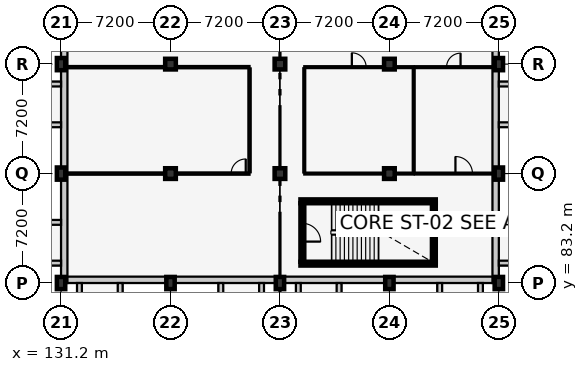
"""IFC4 building model, lengths in metres.
Left out: names, types, materials, properties, quantities, classifications, styles, units other than length and angle.
Written with IfcOpenShell. Run it as: python <this file> out.ifc"""

import sys

from ifc_helpers import new_model, si_unit, direction, frame, frame_2d, origin, origin_2d, place, context, subcontext, project, spatial, rectangle, extrude, element, fill, save


model = new_model("IFC4")
c1 = context("Model", 3, precision=1e-05, world=origin(), true_north=direction((0.0, 1.0)))
c2 = subcontext(c1, "Body", "Model", "MODEL_VIEW")
j1 = project(units=[si_unit("LENGTHUNIT", "METRE"), si_unit("PLANEANGLEUNIT", "RADIAN")], contexts=[c1])
p1 = place(None, origin())
s1 = spatial("IfcSite", under=j1, at=p1, CompositionType="ELEMENT")
p2 = place(p1, origin())
s2 = spatial("IfcBuilding", under=s1, at=p2, CompositionType="ELEMENT")
p3 = place(p2, frame((0.0, 0.0, 13.8)))
s3 = spatial("IfcBuildingStorey", under=s2, at=p3, CompositionType="ELEMENT", Elevation=13.8)
for number, where, z_axis, x_axis in (
    (1, (131.2, 83.2, 0.0), (0.0, 0.0, 1.0), (1.0, 0.0, 0.0)),
    (2, (131.2, 90.4, 0.0), (0.0, 0.0, 1.0), (1.0, 0.0, 0.0)),
    (3, (131.2, 97.6, 0.0), (0.0, 0.0, 1.0), (1.0, 0.0, 0.0)),
    (4, (138.4, 83.2, 0.0), (0.0, 0.0, 1.0), (1.0, 0.0, 0.0)),
):
    element("IfcColumn", number, at=place(p3, frame(where, z_axis=z_axis, x_axis=x_axis)), inside=s3, PredefinedType="COLUMN", context=c2, shape_type="SweptSolid", body=[
        extrude(rectangle(XDim=0.55, YDim=0.8, at=origin_2d()), origin(), (0.0, 0.0, 1.0), 4.2),
    ])
for number, where, z_axis, x_axis in (
    (5, (138.4, 90.4, 0.0), (0.0, 0.0, 1.0), (1.0, 0.0, 0.0)),
    (6, (138.4, 97.6, 0.0), (0.0, 0.0, 1.0), (1.0, 0.0, 0.0)),
):
    element("IfcColumn", number, at=place(p3, frame(where, z_axis=z_axis, x_axis=x_axis)), inside=s3, PredefinedType="COLUMN", context=c2, shape_type="SweptSolid", body=[
        extrude(rectangle(XDim=0.7, YDim=0.7, at=origin_2d()), origin(), (0.0, 0.0, 1.0), 4.2),
    ])
p4 = place(p3, frame((145.6, 83.2, 0.0), z_axis=(0.0, 0.0, 1.0), x_axis=(1.0, 0.0, 0.0)))
e7 = element("IfcColumn", 7, at=p4, inside=s3, PredefinedType="COLUMN", context=c2, shape_type="SweptSolid", body=[
    extrude(rectangle(XDim=0.55, YDim=0.8, at=origin_2d()), origin(), (0.0, 0.0, 1.0), 4.2),
])
for number, where, z_axis, x_axis in (
    (8, (145.6, 90.4, 0.0), (0.0, 0.0, 1.0), (1.0, 0.0, 0.0)),
    (9, (145.6, 97.6, 0.0), (0.0, 0.0, 1.0), (1.0, 0.0, 0.0)),
):
    element("IfcColumn", number, at=place(p3, frame(where, z_axis=z_axis, x_axis=x_axis)), inside=s3, PredefinedType="COLUMN", context=c2, shape_type="SweptSolid", body=[
        extrude(rectangle(XDim=0.7, YDim=0.7, at=origin_2d()), origin(), (0.0, 0.0, 1.0), 4.2),
    ])
p5 = place(p3, frame((152.8, 83.2, 0.0), z_axis=(0.0, 0.0, 1.0), x_axis=(1.0, 0.0, 0.0)))
e10 = element("IfcColumn", 10, at=p5, inside=s3, PredefinedType="COLUMN", context=c2, shape_type="SweptSolid", body=[
    extrude(rectangle(XDim=0.55, YDim=0.8, at=origin_2d()), origin(), (0.0, 0.0, 1.0), 4.2),
])
for number, where, z_axis, x_axis in (
    (11, (152.8, 90.4, 0.0), (0.0, 0.0, 1.0), (1.0, 0.0, 0.0)),
    (12, (152.8, 97.6, 0.0), (0.0, 0.0, 1.0), (1.0, 0.0, 0.0)),
):
    element("IfcColumn", number, at=place(p3, frame(where, z_axis=z_axis, x_axis=x_axis)), inside=s3, PredefinedType="COLUMN", context=c2, shape_type="SweptSolid", body=[
        extrude(rectangle(XDim=0.7, YDim=0.7, at=origin_2d()), origin(), (0.0, 0.0, 1.0), 4.2),
    ])
for number, where, z_axis, x_axis in (
    (13, (160.0, 83.2, 0.0), (0.0, 0.0, 1.0), (1.0, 0.0, 0.0)),
    (14, (160.0, 90.4, 0.0), (0.0, 0.0, 1.0), (1.0, 0.0, 0.0)),
    (15, (160.0, 97.6, 0.0), (0.0, 0.0, 1.0), (1.0, 0.0, 0.0)),
):
    element("IfcColumn", number, at=place(p3, frame(where, z_axis=z_axis, x_axis=x_axis)), inside=s3, PredefinedType="COLUMN", context=c2, shape_type="SweptSolid", body=[
        extrude(rectangle(XDim=0.55, YDim=0.8, at=origin_2d()), origin(), (0.0, 0.0, 1.0), 4.2),
    ])
p6 = place(p3, frame((160.0, 83.41, 0.0), z_axis=(0.0, 0.0, 1.0), x_axis=(-1.0, 0.0, 0.0)))
e16 = element("IfcWall", 16, at=p6, inside=s3, PredefinedType="SOLIDWALL", context=c2, shape_type="SweptSolid", body=[
    extrude(rectangle(XDim=28.8, YDim=0.42, at=frame_2d((14.4, 0.0))), origin(), (0.0, 0.0, 1.0), 3.245),
])
p7 = place(p3, frame((132.41, 83.2, 0.0), z_axis=(0.0, 0.0, 1.0), x_axis=(0.0, -1.0, 0.0)))
e17 = element("IfcWall", 17, at=p7, inside=s3, PredefinedType="SOLIDWALL", context=c2, shape_type="SweptSolid", body=[
    extrude(rectangle(XDim=1.793, YDim=0.32, at=frame_2d((0.896, 0.0))), origin(), (0.0, 0.0, 1.0), 3.93),
])
for number, where, z_axis, x_axis in (
    (18, (135.09, 83.2, 0.0), (0.0, 0.0, 1.0), (0.0, -1.0, 0.0)),
    (19, (141.71, 83.2, 0.0), (0.0, 0.0, 1.0), (0.0, -1.0, 0.0)),
):
    element("IfcWall", number, at=place(p3, frame(where, z_axis=z_axis, x_axis=x_axis)), inside=s3, PredefinedType="SOLIDWALL", context=c2, shape_type="SweptSolid", body=[
        extrude(rectangle(XDim=1.35, YDim=0.32, at=frame_2d((0.675, 0.0))), origin(), (0.0, 0.0, 1.0), 3.93),
    ])
for number, where, z_axis, x_axis in (
    (20, (144.39, 83.2, 0.0), (0.0, 0.0, 1.0), (0.0, -1.0, 0.0)),
    (21, (146.81, 83.2, 0.0), (0.0, 0.0, 1.0), (0.0, -1.0, 0.0)),
):
    element("IfcWall", number, at=place(p3, frame(where, z_axis=z_axis, x_axis=x_axis)), inside=s3, PredefinedType="SOLIDWALL", context=c2, shape_type="SweptSolid", body=[
        extrude(rectangle(XDim=1.793, YDim=0.32, at=frame_2d((0.896, 0.0))), origin(), (0.0, 0.0, 1.0), 3.93),
    ])
for number, where, z_axis, x_axis in (
    (22, (149.49, 83.2, 0.0), (0.0, 0.0, 1.0), (0.0, -1.0, 0.0)),
    (23, (156.11, 83.2, 0.0), (0.0, 0.0, 1.0), (0.0, -1.0, 0.0)),
):
    element("IfcWall", number, at=place(p3, frame(where, z_axis=z_axis, x_axis=x_axis)), inside=s3, PredefinedType="SOLIDWALL", context=c2, shape_type="SweptSolid", body=[
        extrude(rectangle(XDim=1.35, YDim=0.32, at=frame_2d((0.675, 0.0))), origin(), (0.0, 0.0, 1.0), 3.93),
    ])
p8 = place(p3, frame((158.79, 83.2, 0.0), z_axis=(0.0, 0.0, 1.0), x_axis=(0.0, -1.0, 0.0)))
e24 = element("IfcWall", 24, at=p8, inside=s3, PredefinedType="SOLIDWALL", context=c2, shape_type="SweptSolid", body=[
    extrude(rectangle(XDim=1.793, YDim=0.32, at=frame_2d((0.896, 0.0))), origin(), (0.0, 0.0, 1.0), 3.93),
])
p9 = place(p3, frame((159.79, 112.0, 0.0), z_axis=(0.0, 0.0, 1.0), x_axis=(0.0, -1.0, 0.0)))
e25 = element("IfcWall", 25, at=p9, inside=s3, PredefinedType="SOLIDWALL", context=c2, shape_type="SweptSolid", body=[
    extrude(rectangle(XDim=28.8, YDim=0.42, at=frame_2d((14.4, 0.0))), origin(), (0.0, 0.0, 1.0), 3.205),
])
p10 = place(p3, frame((160.0, 84.51, 0.0), z_axis=(0.0, 0.0, 1.0), x_axis=(1.0, 0.0, 0.0)))
e26 = element("IfcWall", 26, at=p10, inside=s3, PredefinedType="SOLIDWALL", context=c2, shape_type="SweptSolid", body=[
    extrude(rectangle(XDim=1.35, YDim=0.32, at=frame_2d((0.675, 0.0))), origin(), (0.0, 0.0, 1.0), 3.93),
])
for number, where, z_axis, x_axis in (
    (27, (160.0, 87.19, 0.0), (0.0, 0.0, 1.0), (1.0, 0.0, 0.0)),
    (28, (160.0, 93.61, 0.0), (0.0, 0.0, 1.0), (1.0, 0.0, 0.0)),
):
    element("IfcWall", number, at=place(p3, frame(where, z_axis=z_axis, x_axis=x_axis)), inside=s3, PredefinedType="SOLIDWALL", context=c2, shape_type="SweptSolid", body=[
        extrude(rectangle(XDim=1.793, YDim=0.32, at=frame_2d((0.896, 0.0))), origin(), (0.0, 0.0, 1.0), 3.93),
    ])
p11 = place(p3, frame((160.0, 96.29, 0.0), z_axis=(0.0, 0.0, 1.0), x_axis=(1.0, 0.0, 0.0)))
e29 = element("IfcWall", 29, at=p11, inside=s3, PredefinedType="SOLIDWALL", context=c2, shape_type="SweptSolid", body=[
    extrude(rectangle(XDim=1.35, YDim=0.32, at=frame_2d((0.675, 0.0))), origin(), (0.0, 0.0, 1.0), 3.93),
])
p12 = place(p3, frame((131.41, 83.2, 0.0), z_axis=(0.0, 0.0, 1.0), x_axis=(0.0, 1.0, 0.0)))
e30 = element("IfcWall", 30, at=p12, inside=s3, PredefinedType="SOLIDWALL", context=c2, shape_type="SweptSolid", body=[
    extrude(rectangle(XDim=28.8, YDim=0.42, at=frame_2d((14.4, 0.0))), origin(), (0.0, 0.0, 1.0), 3.205),
])
p13 = place(p3, frame((131.2, 84.51, 0.0), z_axis=(0.0, 0.0, 1.0), x_axis=(-1.0, 0.0, 0.0)))
e31 = element("IfcWall", 31, at=p13, inside=s3, PredefinedType="SOLIDWALL", context=c2, shape_type="SweptSolid", body=[
    extrude(rectangle(XDim=1.793, YDim=0.32, at=frame_2d((0.896, 0.0))), origin(), (0.0, 0.0, 1.0), 3.93),
])
for number, where, z_axis, x_axis in (
    (32, (131.2, 87.19, 0.0), (0.0, 0.0, 1.0), (-1.0, 0.0, 0.0)),
    (33, (131.2, 93.61, 0.0), (0.0, 0.0, 1.0), (-1.0, 0.0, 0.0)),
):
    element("IfcWall", number, at=place(p3, frame(where, z_axis=z_axis, x_axis=x_axis)), inside=s3, PredefinedType="SOLIDWALL", context=c2, shape_type="SweptSolid", body=[
        extrude(rectangle(XDim=1.35, YDim=0.32, at=frame_2d((0.675, 0.0))), origin(), (0.0, 0.0, 1.0), 3.93),
    ])
p14 = place(p3, frame((131.2, 96.29, 0.0), z_axis=(0.0, 0.0, 1.0), x_axis=(-1.0, 0.0, 0.0)))
e34 = element("IfcWall", 34, at=p14, inside=s3, PredefinedType="SOLIDWALL", context=c2, shape_type="SweptSolid", body=[
    extrude(rectangle(XDim=1.793, YDim=0.32, at=frame_2d((0.896, 0.0))), origin(), (0.0, 0.0, 1.0), 3.93),
])
for number, where, z_axis, x_axis in (
    (35, (146.95, 84.475, 0.0), (0.0, 0.0, 1.0), (1.0, 0.0, 0.0)),
    (36, (155.85, 88.575, 0.0), (0.0, 0.0, 1.0), (-1.0, 0.0, 0.0)),
):
    element("IfcWall", number, at=place(p3, frame(where, z_axis=z_axis, x_axis=x_axis)), inside=s3, PredefinedType="SHEAR", context=c2, shape_type="SweptSolid", body=[
        extrude(rectangle(XDim=8.9, YDim=0.25, at=frame_2d((4.45, 0.0))), origin(), (0.0, 0.0, 1.0), 3.95),
    ])
p15 = place(p3, frame((147.075, 88.45, 0.0), z_axis=(0.0, 0.0, 1.0), x_axis=(0.0, -1.0, 0.0)))
e37 = element("IfcWall", 37, at=p15, inside=s3, PredefinedType="SHEAR", context=c2, shape_type="SweptSolid", body=[
    extrude(rectangle(XDim=3.85, YDim=0.25, at=frame_2d((1.925, 0.0))), origin(), (0.0, 0.0, 1.0), 3.95),
])
p16 = place(p15, frame((1.325, 0.0, 0.0)))
e38 = element("IfcOpeningElement", 38, at=p16, cuts=e37, PredefinedType="OPENING", context=c2, shape_type="SweptSolid", body=[
    extrude(rectangle(XDim=1.2, YDim=2.15, at=frame_2d((0.6, 1.075))), frame((0.0, 0.137, 0.0), z_axis=(0.0, -1.0, 0.0), x_axis=(1.0, 0.0, 0.0)), (0.0, 0.0, 1.0), 0.274),
])
p17 = place(p3, frame((155.725, 84.6, 0.0), z_axis=(0.0, 0.0, 1.0), x_axis=(0.0, 1.0, 0.0)))
e39 = element("IfcWall", 39, at=p17, inside=s3, PredefinedType="SHEAR", context=c2, shape_type="SweptSolid", body=[
    extrude(rectangle(XDim=3.85, YDim=0.25, at=frame_2d((1.925, 0.0))), origin(), (0.0, 0.0, 1.0), 3.95),
])
p18 = place(p3, frame((131.63, 90.4, 0.0), z_axis=(0.0, 0.0, 1.0), x_axis=(1.0, 0.0, 0.0)))
e40 = element("IfcWall", 40, at=p18, inside=s3, PredefinedType="PARTITIONING", context=c2, shape_type="SweptSolid", body=[
    extrude(rectangle(XDim=11.97, YDim=0.15, at=frame_2d((5.985, 0.0))), origin(), (0.0, 0.0, 1.0), 3.175),
])
p19 = place(p18, frame((10.76, 0.0, 0.0)))
e41 = element("IfcOpeningElement", 41, at=p19, cuts=e40, PredefinedType="OPENING", context=c2, shape_type="SweptSolid", body=[
    extrude(rectangle(XDim=0.96, YDim=2.1, at=frame_2d((0.48, 1.05))), frame((0.0, 0.087, 0.0), z_axis=(0.0, -1.0, 0.0), x_axis=(1.0, 0.0, 0.0)), (0.0, 0.0, 1.0), 0.174),
])
p20 = place(p3, frame((131.63, 97.4, 0.0), z_axis=(0.0, 0.0, 1.0), x_axis=(1.0, 0.0, 0.0)))
e42 = element("IfcWall", 42, at=p20, inside=s3, PredefinedType="PARTITIONING", context=c2, shape_type="SweptSolid", body=[
    extrude(rectangle(XDim=11.97, YDim=0.15, at=frame_2d((5.985, 0.0))), origin(), (0.0, 0.0, 1.0), 3.175),
])
p21 = place(p3, frame((143.6, 90.485, 0.0), z_axis=(0.0, 0.0, 1.0), x_axis=(0.0, 1.0, 0.0)))
e43 = element("IfcWall", 43, at=p21, inside=s3, PredefinedType="PARTITIONING", context=c2, shape_type="SweptSolid", body=[
    extrude(rectangle(XDim=6.83, YDim=0.15, at=frame_2d((3.415, 0.0))), origin(), (0.0, 0.0, 1.0), 3.95),
])
p22 = place(p3, frame((147.2, 90.4, 0.0), z_axis=(0.0, 0.0, 1.0), x_axis=(1.0, 0.0, 0.0)))
e44 = element("IfcWall", 44, at=p22, inside=s3, PredefinedType="PARTITIONING", context=c2, shape_type="SweptSolid", body=[
    extrude(rectangle(XDim=7.2, YDim=0.125, at=frame_2d((3.6, 0.0))), origin(), (0.0, 0.0, 1.0), 3.075),
])
p23 = place(p3, frame((147.2, 97.4, 0.0), z_axis=(0.0, 0.0, 1.0), x_axis=(1.0, 0.0, 0.0)))
e45 = element("IfcWall", 45, at=p23, inside=s3, PredefinedType="PARTITIONING", context=c2, shape_type="SweptSolid", body=[
    extrude(rectangle(XDim=7.2, YDim=0.125, at=frame_2d((3.6, 0.0))), origin(), (0.0, 0.0, 1.0), 3.075),
])
p24 = place(p23, frame((3.13, 0.0, 0.0)))
e46 = element("IfcOpeningElement", 46, at=p24, cuts=e45, PredefinedType="OPENING", context=c2, shape_type="SweptSolid", body=[
    extrude(rectangle(XDim=0.94, YDim=2.1, at=frame_2d((0.47, 1.05))), frame((0.0, 0.074, 0.0), z_axis=(0.0, -1.0, 0.0), x_axis=(1.0, 0.0, 0.0)), (0.0, 0.0, 1.0), 0.149),
])
for number, where, z_axis, x_axis in (
    (47, (147.2, 90.472, 0.0), (0.0, 0.0, 1.0), (0.0, 1.0, 0.0)),
    (48, (154.4, 90.472, 0.0), (0.0, 0.0, 1.0), (0.0, 1.0, 0.0)),
):
    element("IfcWall", number, at=place(p3, frame(where, z_axis=z_axis, x_axis=x_axis)), inside=s3, PredefinedType="PARTITIONING", context=c2, shape_type="SweptSolid", body=[
        extrude(rectangle(XDim=6.855, YDim=0.125, at=frame_2d((3.427, 0.0))), origin(), (0.0, 0.0, 1.0), 3.95),
    ])
p25 = place(p3, frame((154.472, 90.4, 0.0), z_axis=(0.0, 0.0, 1.0), x_axis=(1.0, 0.0, 0.0)))
e49 = element("IfcWall", 49, at=p25, inside=s3, PredefinedType="PARTITIONING", context=c2, shape_type="SweptSolid", body=[
    extrude(rectangle(XDim=5.098, YDim=0.125, at=frame_2d((2.549, 0.0))), origin(), (0.0, 0.0, 1.0), 3.275),
])
p26 = place(p25, frame((2.673, 0.0, 0.0)))
e50 = element("IfcOpeningElement", 50, at=p26, cuts=e49, PredefinedType="OPENING", context=c2, shape_type="SweptSolid", body=[
    extrude(rectangle(XDim=1.12, YDim=2.15, at=frame_2d((0.56, 1.075))), frame((0.0, 0.074, 0.0), z_axis=(0.0, -1.0, 0.0), x_axis=(1.0, 0.0, 0.0)), (0.0, 0.0, 1.0), 0.149),
])
p27 = place(p3, frame((154.472, 97.4, 0.0), z_axis=(0.0, 0.0, 1.0), x_axis=(1.0, 0.0, 0.0)))
e51 = element("IfcWall", 51, at=p27, inside=s3, PredefinedType="PARTITIONING", context=c2, shape_type="SweptSolid", body=[
    extrude(rectangle(XDim=5.098, YDim=0.125, at=frame_2d((2.549, 0.0))), origin(), (0.0, 0.0, 1.0), 3.275),
])
p28 = place(p27, frame((2.089, 0.0, 0.0)))
e52 = element("IfcOpeningElement", 52, at=p28, cuts=e51, PredefinedType="OPENING", context=c2, shape_type="SweptSolid", body=[
    extrude(rectangle(XDim=0.92, YDim=2.08, at=frame_2d((0.46, 1.04))), frame((0.0, 0.074, 0.0), z_axis=(0.0, -1.0, 0.0), x_axis=(1.0, 0.0, 0.0)), (0.0, 0.0, 1.0), 0.149),
])
p29 = place(p16, origin())
e53 = element("IfcDoor", 53, at=p29, inside=s3, OperationType="SINGLE_SWING_RIGHT", PredefinedType="DOOR", context=c2, shape_type="SweptSolid", body=[
    extrude(rectangle(XDim=1.2, YDim=2.15, at=frame_2d((0.6, 1.075))), frame((0.0, 0.025, 0.0), z_axis=(0.0, -1.0, 0.0), x_axis=(1.0, 0.0, 0.0)), (0.0, 0.0, 1.0), 0.05),
])
fill(e38, e53)
p30 = place(p19, origin())
e54 = element("IfcDoor", 54, at=p30, inside=s3, OperationType="SINGLE_SWING_RIGHT", PredefinedType="DOOR", context=c2, shape_type="SweptSolid", body=[
    extrude(rectangle(XDim=0.96, YDim=2.1, at=frame_2d((0.48, 1.05))), frame((0.0, 0.025, 0.0), z_axis=(0.0, -1.0, 0.0), x_axis=(1.0, 0.0, 0.0)), (0.0, 0.0, 1.0), 0.05),
])
fill(e41, e54)
p31 = place(p24, origin())
e55 = element("IfcDoor", 55, at=p31, inside=s3, OperationType="SINGLE_SWING_LEFT", PredefinedType="DOOR", context=c2, shape_type="SweptSolid", body=[
    extrude(rectangle(XDim=0.94, YDim=2.1, at=frame_2d((0.47, 1.05))), frame((0.0, 0.025, 0.0), z_axis=(0.0, -1.0, 0.0), x_axis=(1.0, 0.0, 0.0)), (0.0, 0.0, 1.0), 0.05),
])
fill(e46, e55)
p32 = place(p28, origin())
e56 = element("IfcDoor", 56, at=p32, inside=s3, OperationType="SINGLE_SWING_RIGHT", PredefinedType="DOOR", context=c2, shape_type="SweptSolid", body=[
    extrude(rectangle(XDim=0.92, YDim=2.08, at=frame_2d((0.46, 1.04))), frame((0.0, 0.025, 0.0), z_axis=(0.0, -1.0, 0.0), x_axis=(1.0, 0.0, 0.0)), (0.0, 0.0, 1.0), 0.05),
])
fill(e52, e56)
p33 = place(p26, origin())
e57 = element("IfcDoor", 57, at=p33, inside=s3, OperationType="SINGLE_SWING_LEFT", PredefinedType="DOOR", context=c2, shape_type="SweptSolid", body=[
    extrude(rectangle(XDim=1.12, YDim=2.15, at=frame_2d((0.56, 1.075))), frame((0.0, 0.025, 0.0), z_axis=(0.0, -1.0, 0.0), x_axis=(1.0, 0.0, 0.0)), (0.0, 0.0, 1.0), 0.05),
])
fill(e50, e57)
save(model, sys.argv[1])
